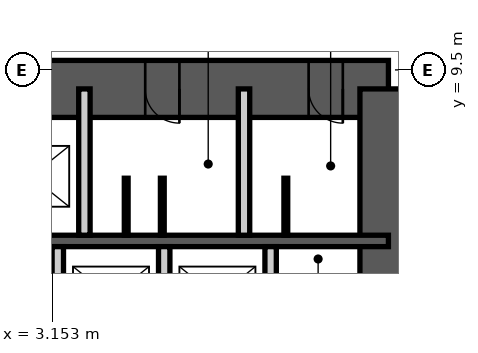
"""IFC4 building model, lengths in metres.
Left out: names, types, materials, properties, quantities, classifications, styles, units other than length and angle.
Written with IfcOpenShell. Run it as: python <this file> out.ifc"""

import sys

from ifc_helpers import new_model, si_unit, direction, frame, frame_2d, origin, place, context, subcontext, project, spatial, rectangle, extrude, element, fill, save


model = new_model("IFC4")
c1 = context("Model", 3, precision=1e-05, world=origin(), true_north=direction((0.0, 1.0)))
c2 = subcontext(c1, "Body", "Model", "MODEL_VIEW")
j1 = project(units=[si_unit("LENGTHUNIT", "METRE"), si_unit("PLANEANGLEUNIT", "RADIAN")], contexts=[c1])
p1 = place(None, origin())
s1 = spatial("IfcSite", under=j1, at=p1, CompositionType="ELEMENT")
p2 = place(p1, origin())
s2 = spatial("IfcBuilding", under=s1, at=p2, CompositionType="ELEMENT")
p3 = place(p2, frame((0.0, 0.0, 97.0)))
s3 = spatial("IfcBuildingStorey", under=s2, at=p3, CompositionType="ELEMENT", Elevation=97.0)
p4 = place(p3, frame((-12.0, 9.0, 0.0), z_axis=(0.0, 0.0, 1.0), x_axis=(1.0, 0.0, 0.0)))
e1 = element("IfcWall", 1, at=p4, inside=s3, PredefinedType="SHEAR", context=c2, shape_type="SweptSolid", body=[
    extrude(rectangle(XDim=24.0, YDim=1.5, at=frame_2d((12.0, 0.0))), origin(), (0.0, 0.0, 1.0), 6.0),
])
p5 = place(p4, frame((10.4, 0.0, 0.0)))
e2 = element("IfcOpeningElement", 2, at=p5, cuts=e1, PredefinedType="OPENING", context=c2, shape_type="SweptSolid", body=[
    extrude(rectangle(XDim=1.0, YDim=2.1, at=frame_2d((0.5, 1.05))), frame((0.0, 0.76, 0.0), z_axis=(0.0, -1.0, 0.0), x_axis=(1.0, 0.0, 0.0)), (0.0, 0.0, 1.0), 1.52),
])
p6 = place(p4, frame((17.6, 0.0, 0.0)))
e3 = element("IfcOpeningElement", 3, at=p6, cuts=e1, PredefinedType="OPENING", context=c2, shape_type="SweptSolid", body=[
    extrude(rectangle(XDim=0.9, YDim=2.1, at=frame_2d((0.45, 1.05))), frame((0.0, 0.76, 0.0), z_axis=(0.0, -1.0, 0.0), x_axis=(1.0, 0.0, 0.0)), (0.0, 0.0, 1.0), 1.52),
])
p7 = place(p4, frame((21.9, 0.0, 0.0)))
e4 = element("IfcOpeningElement", 4, at=p7, cuts=e1, PredefinedType="OPENING", context=c2, shape_type="SweptSolid", body=[
    extrude(rectangle(XDim=0.9, YDim=2.1, at=frame_2d((0.45, 1.05))), frame((0.0, 0.76, 0.0), z_axis=(0.0, -1.0, 0.0), x_axis=(1.0, 0.0, 0.0)), (0.0, 0.0, 1.0), 1.52),
])
p8 = place(p3, frame((12.0, -9.0, 0.0), z_axis=(0.0, 0.0, 1.0), x_axis=(0.0, 1.0, 0.0)))
e5 = element("IfcWall", 5, at=p8, inside=s3, PredefinedType="SHEAR", context=c2, shape_type="SweptSolid", body=[
    extrude(rectangle(XDim=18.0, YDim=1.5, at=frame_2d((9.0, 0.0))), origin(), (0.0, 0.0, 1.0), 6.0),
])
p9 = place(p8, frame((8.1, 0.0, 0.0)))
e6 = element("IfcOpeningElement", 6, at=p9, cuts=e5, PredefinedType="OPENING", context=c2, shape_type="SweptSolid", body=[
    extrude(rectangle(XDim=1.8, YDim=2.1, at=frame_2d((0.9, 1.05))), frame((0.0, 0.76, 0.0), z_axis=(0.0, -1.0, 0.0), x_axis=(1.0, 0.0, 0.0)), (0.0, 0.0, 1.0), 1.52),
])
p10 = place(p3, frame((-12.0, 5.0, 0.0), z_axis=(0.0, 0.0, 1.0), x_axis=(1.0, 0.0, 0.0)))
e7 = element("IfcWall", 7, at=p10, inside=s3, PredefinedType="SHEAR", context=c2, shape_type="SweptSolid", body=[
    extrude(rectangle(XDim=24.0, YDim=0.3, at=frame_2d((12.0, 0.0))), origin(), (0.0, 0.0, 1.0), 6.0),
])
for number, where, z_axis, x_axis in (
    (8, (4.0, 5.15, 0.0), (0.0, 0.0, 1.0), (0.0, 1.0, 0.0)),
    (9, (8.2, 5.15, 0.0), (0.0, 0.0, 1.0), (0.0, 1.0, 0.0)),
):
    element("IfcWall", number, at=place(p3, frame(where, z_axis=z_axis, x_axis=x_axis)), inside=s3, PredefinedType="PARTITIONING", context=c2, shape_type="SweptSolid", body=[
        extrude(rectangle(XDim=3.85, YDim=0.3, at=frame_2d((1.925, 0.0))), origin(), (0.0, 0.0, 1.0), 5.78),
    ])
for number, where, z_axis, x_axis in (
    (10, (3.3, 2.2, 0.0), (0.0, 0.0, 1.0), (0.0, 1.0, 0.0)),
    (11, (6.1, 2.2, 0.0), (0.0, 0.0, 1.0), (0.0, 1.0, 0.0)),
    (12, (8.9, 2.2, 0.0), (0.0, 0.0, 1.0), (0.0, 1.0, 0.0)),
):
    element("IfcWall", number, at=place(p3, frame(where, z_axis=z_axis, x_axis=x_axis)), inside=s3, PredefinedType="PARTITIONING", context=c2, shape_type="SweptSolid", body=[
        extrude(rectangle(XDim=2.65, YDim=0.3, at=frame_2d((1.325, 0.0))), origin(), (0.0, 0.0, 1.0), 5.78),
    ])
for number, where, z_axis, x_axis in (
    (13, (5.1, 5.15, 0.0), (0.0, 0.0, 1.0), (0.0, 1.0, 0.0)),
    (14, (6.05, 5.15, 0.0), (0.0, 0.0, 1.0), (0.0, 1.0, 0.0)),
    (15, (9.3, 5.15, 0.0), (0.0, 0.0, 1.0), (0.0, 1.0, 0.0)),
):
    element("IfcWall", number, at=place(p3, frame(where, z_axis=z_axis, x_axis=x_axis)), inside=s3, PredefinedType="PARTITIONING", context=c2, shape_type="SweptSolid", body=[
        extrude(rectangle(XDim=1.5, YDim=0.1, at=frame_2d((0.75, 0.0))), origin(), (0.0, 0.0, 1.0), 2.1),
    ])
p11 = place(p6, origin())
e16 = element("IfcDoor", 16, at=p11, inside=s3, OperationType="SINGLE_SWING_RIGHT", PredefinedType="DOOR", context=c2, shape_type="SweptSolid", body=[
    extrude(rectangle(XDim=0.9, YDim=2.1, at=frame_2d((0.45, 1.05))), frame((0.0, 0.025, 0.0), z_axis=(0.0, -1.0, 0.0), x_axis=(1.0, 0.0, 0.0)), (0.0, 0.0, 1.0), 0.05),
])
fill(e3, e16)
p12 = place(p7, origin())
e17 = element("IfcDoor", 17, at=p12, inside=s3, OperationType="SINGLE_SWING_RIGHT", PredefinedType="DOOR", context=c2, shape_type="SweptSolid", body=[
    extrude(rectangle(XDim=0.9, YDim=2.1, at=frame_2d((0.45, 1.05))), frame((0.0, 0.025, 0.0), z_axis=(0.0, -1.0, 0.0), x_axis=(1.0, 0.0, 0.0)), (0.0, 0.0, 1.0), 0.05),
])
fill(e4, e17)
save(model, sys.argv[1])
